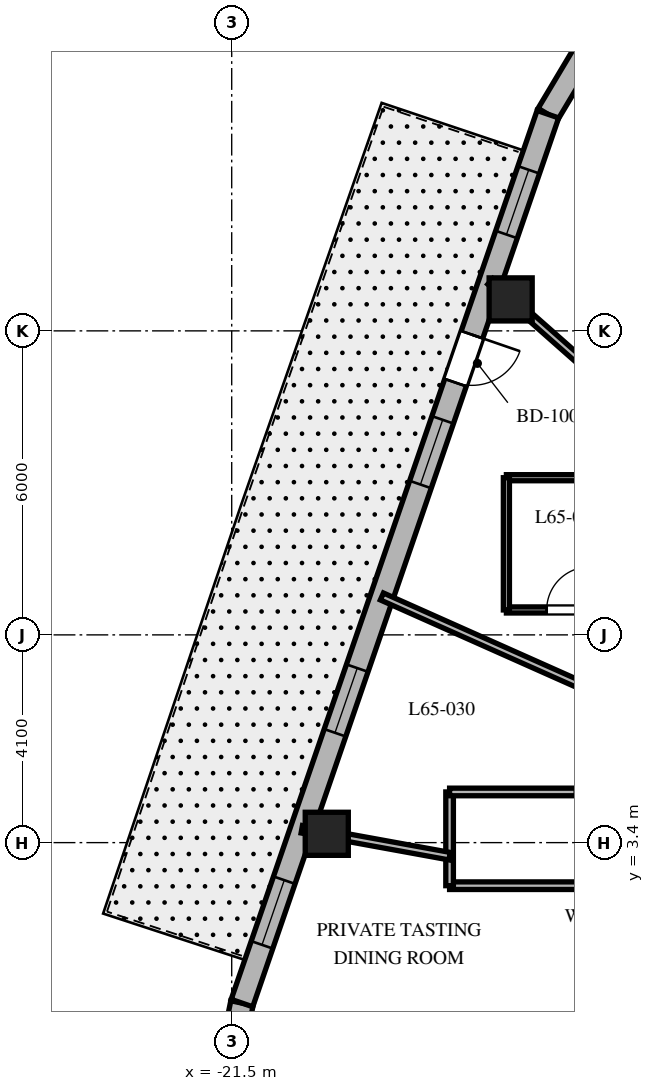
"""IFC4 building model, lengths in metres.
Left out: names, types, materials, properties, quantities, classifications, styles, units other than length and angle.
Written with IfcOpenShell. Run it as: python <this file> out.ifc"""

import sys

from ifc_helpers import new_model, si_unit, direction, frame, frame_2d, origin, origin_2d, place, context, subcontext, project, spatial, rectangle, extrude, element, fill, save


model = new_model("IFC4")
c1 = context("Model", 3, precision=1e-05, world=origin(), true_north=direction((0.0, 1.0)))
c2 = subcontext(c1, "Body", "Model", "MODEL_VIEW")
j1 = project(units=[si_unit("LENGTHUNIT", "METRE"), si_unit("PLANEANGLEUNIT", "RADIAN")], contexts=[c1])
p1 = place(None, origin())
s1 = spatial("IfcSite", under=j1, at=p1, CompositionType="ELEMENT")
p2 = place(p1, origin())
s2 = spatial("IfcBuilding", under=s1, at=p2, CompositionType="ELEMENT")
p3 = place(p2, frame((0.0, 0.0, 261.3)))
s3 = spatial("IfcBuildingStorey", under=s2, at=p3, CompositionType="ELEMENT", Elevation=261.3)
for number, where, z_axis, x_axis in (
    (1, (-15.995, 14.121, 0.0), (0.0, 0.0, 1.0), (1.0, 0.0, 0.0)),
    (2, (-19.624, 3.574, 0.0), (0.0, 0.0, 1.0), (1.0, 0.0, 0.0)),
):
    element("IfcColumn", number, at=place(p3, frame(where, z_axis=z_axis, x_axis=x_axis)), inside=s3, PredefinedType="COLUMN", context=c2, shape_type="SweptSolid", body=[
        extrude(rectangle(XDim=0.85, YDim=0.85, at=origin_2d()), origin(), (0.0, 0.0, 1.0), 3.9),
    ])
p4 = place(p3, frame((-14.54, 18.984, 0.0), z_axis=(0.0, 0.0, 1.0), x_axis=(-0.512374906623, -0.858761873317, 0.0)))
e3 = element("IfcWall", 3, at=p4, inside=s3, PredefinedType="SOLIDWALL", context=c2, shape_type="SweptSolid", body=[
    extrude(rectangle(XDim=1.406, YDim=0.45, at=frame_2d((0.703, 0.0))), origin(), (0.0, 0.0, 1.0), 3.6),
])
p5 = place(p3, frame((-21.298, 0.233, 0.0), z_axis=(0.0, 0.0, 1.0), x_axis=(-0.199158176661, -0.979967356941, 0.0)))
e4 = element("IfcWall", 4, at=p5, inside=s3, PredefinedType="SOLIDWALL", context=c2, shape_type="SweptSolid", body=[
    extrude(rectangle(XDim=0.895, YDim=0.45, at=frame_2d((0.447, 0.0))), origin(), (0.0, 0.0, 1.0), 3.6),
])
p6 = place(p3, frame((-15.26, 17.776, 0.0), z_axis=(0.0, 0.0, 1.0), x_axis=(-0.325407437101, -0.945573899745, 0.0)))
e5 = element("IfcWall", 5, at=p6, inside=s3, PredefinedType="SOLIDWALL", context=c2, shape_type="SweptSolid", body=[
    extrude(rectangle(XDim=18.552, YDim=0.45, at=frame_2d((9.276, 0.0))), origin(), (0.0, 0.0, 1.0), 3.6),
])
p7 = place(p6, frame((4.602, 0.0, 0.0)))
e6 = element("IfcOpeningElement", 6, at=p7, cuts=e5, PredefinedType="OPENING", context=c2, shape_type="SweptSolid", body=[
    extrude(rectangle(XDim=1.0, YDim=2.15, at=frame_2d((0.5, 1.075))), frame((0.0, 0.235, 0.0), z_axis=(0.0, -1.0, 0.0), x_axis=(1.0, 0.0, 0.0)), (0.0, 0.0, 1.0), 0.47),
])
p8 = place(p6, frame((1.161, 0.0, 0.8)))
e7 = element("IfcOpeningElement", 7, at=p8, cuts=e5, PredefinedType="OPENING", context=c2, shape_type="SweptSolid", body=[
    extrude(rectangle(XDim=1.35, YDim=1.75, at=frame_2d((0.675, 0.875))), frame((0.0, 0.235, 0.0), z_axis=(0.0, -1.0, 0.0), x_axis=(1.0, 0.0, 0.0)), (0.0, 0.0, 1.0), 0.47),
])
p9 = place(p6, frame((6.379, 0.0, 0.8)))
e8 = element("IfcOpeningElement", 8, at=p9, cuts=e5, PredefinedType="OPENING", context=c2, shape_type="SweptSolid", body=[
    extrude(rectangle(XDim=1.35, YDim=1.75, at=frame_2d((0.675, 0.875))), frame((0.0, 0.235, 0.0), z_axis=(0.0, -1.0, 0.0), x_axis=(1.0, 0.0, 0.0)), (0.0, 0.0, 1.0), 0.47),
])
p10 = place(p6, frame((11.561, 0.0, 0.8)))
e9 = element("IfcOpeningElement", 9, at=p10, cuts=e5, PredefinedType="OPENING", context=c2, shape_type="SweptSolid", body=[
    extrude(rectangle(XDim=1.35, YDim=1.75, at=frame_2d((0.675, 0.875))), frame((0.0, 0.235, 0.0), z_axis=(0.0, -1.0, 0.0), x_axis=(1.0, 0.0, 0.0)), (0.0, 0.0, 1.0), 0.47),
])
p11 = place(p6, frame((15.987, 0.0, 0.8)))
e10 = element("IfcOpeningElement", 10, at=p11, cuts=e5, PredefinedType="OPENING", context=c2, shape_type="SweptSolid", body=[
    extrude(rectangle(XDim=1.35, YDim=1.75, at=frame_2d((0.675, 0.875))), frame((0.0, 0.235, 0.0), z_axis=(0.0, -1.0, 0.0), x_axis=(1.0, 0.0, 0.0)), (0.0, 0.0, 1.0), 0.47),
])
p12 = place(p3, frame((-11.35, 2.55, 0.0), z_axis=(0.0, 0.0, 1.0), x_axis=(-1.0, 0.0, 0.0)))
e11 = element("IfcWall", 11, at=p12, inside=s3, PredefinedType="PARTITIONING", context=c2, shape_type="SweptSolid", body=[
    extrude(rectangle(XDim=5.85, YDim=0.15, at=frame_2d((2.925, 0.0))), origin(), (0.0, 0.0, 1.0), 3.041),
])
p13 = place(p3, frame((-17.2, 2.55, 0.0), z_axis=(0.0, 0.0, 1.0), x_axis=(0.0, 1.0, 0.0)))
e12 = element("IfcWall", 12, at=p13, inside=s3, PredefinedType="PARTITIONING", context=c2, shape_type="SweptSolid", body=[
    extrude(rectangle(XDim=1.85, YDim=0.15, at=frame_2d((0.925, 0.0))), origin(), (0.0, 0.0, 1.0), 3.09),
])
p14 = place(p3, frame((-17.2, 4.4, 0.0), z_axis=(0.0, 0.0, 1.0), x_axis=(1.0, 0.0, 0.0)))
e13 = element("IfcWall", 13, at=p14, inside=s3, PredefinedType="PARTITIONING", context=c2, shape_type="SweptSolid", body=[
    extrude(rectangle(XDim=5.85, YDim=0.15, at=frame_2d((2.925, 0.0))), origin(), (0.0, 0.0, 1.0), 3.041),
])
p15 = place(p14, frame((2.475, 0.0, 0.0)))
e14 = element("IfcOpeningElement", 14, at=p15, cuts=e13, PredefinedType="OPENING", context=c2, shape_type="SweptSolid", body=[
    extrude(rectangle(XDim=0.9, YDim=2.03, at=frame_2d((0.45, 1.015))), frame((0.0, 0.085, 0.0), z_axis=(0.0, -1.0, 0.0), x_axis=(1.0, 0.0, 0.0)), (0.0, 0.0, 1.0), 0.17),
])
p16 = place(p3, frame((-11.157, 9.85, 0.0), z_axis=(0.0, 0.0, 1.0), x_axis=(-0.74966962095, 0.661812253909, 0.0)))
e15 = element("IfcWall", 15, at=p16, inside=s3, PredefinedType="PARTITIONING", context=c2, shape_type="SweptSolid", body=[
    extrude(rectangle(XDim=6.989, YDim=0.15, at=frame_2d((3.494, 0.0))), origin(), (0.0, 0.0, 1.0), 2.94),
])
p17 = place(p3, frame((-11.35, 5.057, 0.0), z_axis=(0.0, 0.0, 1.0), x_axis=(-0.91344644156, 0.406958964026, 0.0)))
e16 = element("IfcWall", 16, at=p17, inside=s3, PredefinedType="PARTITIONING", context=c2, shape_type="SweptSolid", body=[
    extrude(rectangle(XDim=7.867, YDim=0.15, at=frame_2d((3.933, 0.0))), origin(), (0.0, 0.0, 1.0), 2.94),
])
p18 = place(p3, frame((-17.2, 3.133, 0.0), z_axis=(0.0, 0.0, 1.0), x_axis=(-0.983817168797, 0.179175272791, 0.0)))
e17 = element("IfcWall", 17, at=p18, inside=s3, PredefinedType="PARTITIONING", context=c2, shape_type="SweptSolid", body=[
    extrude(rectangle(XDim=2.965, YDim=0.15, at=frame_2d((1.482, 0.0))), origin(), (0.0, 0.0, 1.0), 2.94),
])
p19 = place(p3, frame((-16.079, 7.992, 0.0), z_axis=(0.0, 0.0, 1.0), x_axis=(1.0, 0.0, 0.0)))
e18 = element("IfcWall", 18, at=p19, inside=s3, PredefinedType="PARTITIONING", context=c2, shape_type="SweptSolid", body=[
    extrude(rectangle(XDim=2.44, YDim=0.12, at=frame_2d((1.22, 0.0))), origin(), (0.0, 0.0, 1.0), 3.172),
])
p20 = place(p19, frame((0.795, 0.0, 0.0)))
e19 = element("IfcOpeningElement", 19, at=p20, cuts=e18, PredefinedType="OPENING", context=c2, shape_type="SweptSolid", body=[
    extrude(rectangle(XDim=0.85, YDim=2.03, at=frame_2d((0.425, 1.015))), frame((0.0, 0.07, 0.0), z_axis=(0.0, -1.0, 0.0), x_axis=(1.0, 0.0, 0.0)), (0.0, 0.0, 1.0), 0.14),
])
p21 = place(p3, frame((-13.639, 10.602, 0.0), z_axis=(0.0, 0.0, 1.0), x_axis=(-1.0, 0.0, 0.0)))
e20 = element("IfcWall", 20, at=p21, inside=s3, PredefinedType="PARTITIONING", context=c2, shape_type="SweptSolid", body=[
    extrude(rectangle(XDim=2.44, YDim=0.12, at=frame_2d((1.22, 0.0))), origin(), (0.0, 0.0, 1.0), 3.172),
])
p22 = place(p3, frame((-16.079, 10.602, 0.0), z_axis=(0.0, 0.0, 1.0), x_axis=(0.0, -1.0, 0.0)))
e21 = element("IfcWall", 21, at=p22, inside=s3, PredefinedType="PARTITIONING", context=c2, shape_type="SweptSolid", body=[
    extrude(rectangle(XDim=2.61, YDim=0.12, at=frame_2d((1.305, 0.0))), origin(), (0.0, 0.0, 1.0), 3.6),
])
p23 = place(p7, origin())
e22 = element("IfcDoor", 22, at=p23, inside=s3, OperationType="SINGLE_SWING_LEFT", PredefinedType="DOOR", context=c2, shape_type="SweptSolid", body=[
    extrude(rectangle(XDim=1.0, YDim=2.15, at=frame_2d((0.5, 1.075))), frame((0.0, 0.025, 0.0), z_axis=(0.0, -1.0, 0.0), x_axis=(1.0, 0.0, 0.0)), (0.0, 0.0, 1.0), 0.05),
])
fill(e6, e22)
p24 = place(p8, origin())
e23 = element("IfcWindow", 23, at=p24, inside=s3, PartitioningType="SINGLE_PANEL", PredefinedType="WINDOW", context=c2, shape_type="SweptSolid", body=[
    extrude(rectangle(XDim=1.35, YDim=1.75, at=frame_2d((0.675, 0.875))), frame((0.0, 0.03, 0.0), z_axis=(0.0, -1.0, 0.0), x_axis=(1.0, 0.0, 0.0)), (0.0, 0.0, 1.0), 0.06),
])
fill(e7, e23)
p25 = place(p9, origin())
e24 = element("IfcWindow", 24, at=p25, inside=s3, PartitioningType="SINGLE_PANEL", PredefinedType="WINDOW", context=c2, shape_type="SweptSolid", body=[
    extrude(rectangle(XDim=1.35, YDim=1.75, at=frame_2d((0.675, 0.875))), frame((0.0, 0.03, 0.0), z_axis=(0.0, -1.0, 0.0), x_axis=(1.0, 0.0, 0.0)), (0.0, 0.0, 1.0), 0.06),
])
fill(e8, e24)
p26 = place(p10, origin())
e25 = element("IfcWindow", 25, at=p26, inside=s3, PartitioningType="SINGLE_PANEL", PredefinedType="WINDOW", context=c2, shape_type="SweptSolid", body=[
    extrude(rectangle(XDim=1.35, YDim=1.75, at=frame_2d((0.675, 0.875))), frame((0.0, 0.03, 0.0), z_axis=(0.0, -1.0, 0.0), x_axis=(1.0, 0.0, 0.0)), (0.0, 0.0, 1.0), 0.06),
])
fill(e9, e25)
p27 = place(p11, origin())
e26 = element("IfcWindow", 26, at=p27, inside=s3, PartitioningType="SINGLE_PANEL", PredefinedType="WINDOW", context=c2, shape_type="SweptSolid", body=[
    extrude(rectangle(XDim=1.35, YDim=1.75, at=frame_2d((0.675, 0.875))), frame((0.0, 0.03, 0.0), z_axis=(0.0, -1.0, 0.0), x_axis=(1.0, 0.0, 0.0)), (0.0, 0.0, 1.0), 0.06),
])
fill(e10, e26)
p28 = place(p20, origin())
e27 = element("IfcDoor", 27, at=p28, inside=s3, OperationType="SINGLE_SWING_RIGHT", PredefinedType="DOOR", context=c2, shape_type="SweptSolid", body=[
    extrude(rectangle(XDim=0.85, YDim=2.03, at=frame_2d((0.425, 1.015))), frame((0.0, 0.025, 0.0), z_axis=(0.0, -1.0, 0.0), x_axis=(1.0, 0.0, 0.0)), (0.0, 0.0, 1.0), 0.05),
])
fill(e19, e27)
save(model, sys.argv[1])
